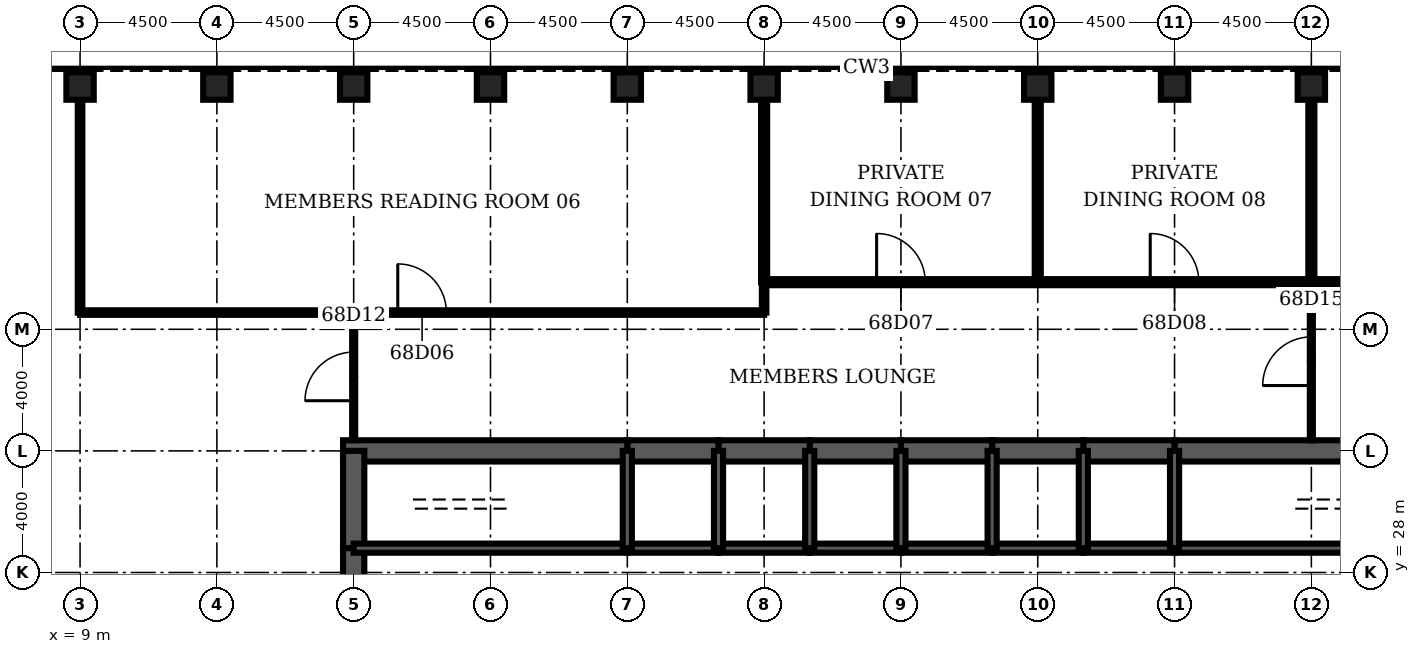
"""IFC4 building model, lengths in metres.
Left out: names, types, materials, properties, quantities, classifications, styles, units other than length and angle.
Written with IfcOpenShell. Run it as: python <this file> out.ifc"""

import sys

from ifc_helpers import new_model, si_unit, direction, frame, frame_2d, origin, origin_2d, place, context, subcontext, project, spatial, rectangle, hollow_rectangle, extrude, element, fill, save


model = new_model("IFC4")
c1 = context("Model", 3, precision=1e-05, world=origin(), true_north=direction((0.0, 1.0)))
c2 = subcontext(c1, "Body", "Model", "MODEL_VIEW")
j1 = project(units=[si_unit("LENGTHUNIT", "METRE"), si_unit("PLANEANGLEUNIT", "RADIAN")], contexts=[c1])
p1 = place(None, origin())
s1 = spatial("IfcSite", under=j1, at=p1, CompositionType="ELEMENT")
p2 = place(p1, origin())
s2 = spatial("IfcBuilding", under=s1, at=p2, CompositionType="ELEMENT")
p3 = place(p2, frame((0.0, 0.0, 300.5)))
s3 = spatial("IfcBuildingStorey", under=s2, at=p3, CompositionType="ELEMENT", Elevation=300.5)
for number, where, z_axis, x_axis in (
    (1, (49.5, 44.0, 0.0), (0.0, 0.0, 1.0), (0.0, 1.0, 0.0)),
    (2, (45.0, 44.0, 0.0), (0.0, 0.0, 1.0), (0.0, 1.0, 0.0)),
    (3, (40.5, 44.0, 0.0), (0.0, 0.0, 1.0), (0.0, 1.0, 0.0)),
    (4, (36.0, 44.0, 0.0), (0.0, 0.0, 1.0), (0.0, 1.0, 0.0)),
    (5, (31.5, 44.0, 0.0), (0.0, 0.0, 1.0), (0.0, 1.0, 0.0)),
    (6, (27.0, 44.0, 0.0), (0.0, 0.0, 1.0), (0.0, 1.0, 0.0)),
    (7, (22.5, 44.0, 0.0), (0.0, 0.0, 1.0), (0.0, 1.0, 0.0)),
    (8, (18.0, 44.0, 0.0), (0.0, 0.0, 1.0), (0.0, 1.0, 0.0)),
    (9, (13.5, 44.0, 0.0), (0.0, 0.0, 1.0), (0.0, 1.0, 0.0)),
    (10, (9.0, 44.0, 0.0), (0.0, 0.0, 1.0), (0.0, 1.0, 0.0)),
):
    element("IfcColumn", number, at=place(p3, frame(where, z_axis=z_axis, x_axis=x_axis)), inside=s3, PredefinedType="COLUMN", context=c2, shape_type="SweptSolid", body=[
        extrude(hollow_rectangle(XDim=0.9, YDim=0.9, WallThickness=0.06, at=origin_2d()), origin(), (0.0, 0.0, 1.0), 4.2),
    ])
p4 = place(p3, frame((54.35, 32.0, 0.0), z_axis=(0.0, 0.0, 1.0), x_axis=(-1.0, 0.0, 0.0)))
e11 = element("IfcWall", 11, at=p4, inside=s3, PredefinedType="SHEAR", context=c2, shape_type="SweptSolid", body=[
    extrude(rectangle(XDim=9.35, YDim=0.7, at=frame_2d((4.675, 0.0))), origin(), (0.0, 0.0, 1.0), 4.2),
])
for number, where, z_axis, x_axis in (
    (12, (45.0, 32.0, 0.0), (0.0, 0.0, 1.0), (-1.0, 0.0, 0.0)),
    (13, (42.0, 32.0, 0.0), (0.0, 0.0, 1.0), (-1.0, 0.0, 0.0)),
    (14, (39.0, 32.0, 0.0), (0.0, 0.0, 1.0), (-1.0, 0.0, 0.0)),
    (15, (36.0, 32.0, 0.0), (0.0, 0.0, 1.0), (-1.0, 0.0, 0.0)),
    (16, (33.0, 32.0, 0.0), (0.0, 0.0, 1.0), (-1.0, 0.0, 0.0)),
    (17, (30.0, 32.0, 0.0), (0.0, 0.0, 1.0), (-1.0, 0.0, 0.0)),
):
    element("IfcWall", number, at=place(p3, frame(where, z_axis=z_axis, x_axis=x_axis)), inside=s3, PredefinedType="SHEAR", context=c2, shape_type="SweptSolid", body=[
        extrude(rectangle(XDim=3.0, YDim=0.7, at=frame_2d((1.5, 0.0))), origin(), (0.0, 0.0, 1.0), 4.2),
    ])
p5 = place(p3, frame((27.0, 32.0, 0.0), z_axis=(0.0, 0.0, 1.0), x_axis=(-1.0, 0.0, 0.0)))
e18 = element("IfcWall", 18, at=p5, inside=s3, PredefinedType="SHEAR", context=c2, shape_type="SweptSolid", body=[
    extrude(rectangle(XDim=9.35, YDim=0.7, at=frame_2d((4.675, 0.0))), origin(), (0.0, 0.0, 1.0), 4.2),
])
p6 = place(p3, frame((18.0, 32.0, 0.0), z_axis=(0.0, 0.0, 1.0), x_axis=(0.0, -1.0, 0.0)))
e19 = element("IfcWall", 19, at=p6, inside=s3, PredefinedType="SHEAR", context=c2, shape_type="SweptSolid", body=[
    extrude(rectangle(XDim=3.2, YDim=0.7, at=frame_2d((1.6, 0.0))), origin(), (0.0, 0.0, 1.0), 4.2),
])
p7 = place(p3, frame((18.0, 28.8, 0.0), z_axis=(0.0, 0.0, 1.0), x_axis=(0.0, -1.0, 0.0)))
e20 = element("IfcWall", 20, at=p7, inside=s3, PredefinedType="SHEAR", context=c2, shape_type="SweptSolid", body=[
    extrude(rectangle(XDim=2.8, YDim=0.7, at=frame_2d((1.4, 0.0))), origin(), (0.0, 0.0, 1.0), 4.2),
])
p8 = place(p7, frame((0.4, 0.0, 0.0)))
e21 = element("IfcOpeningElement", 21, at=p8, cuts=e20, PredefinedType="OPENING", context=c2, shape_type="SweptSolid", body=[
    extrude(rectangle(XDim=1.8, YDim=2.1, at=frame_2d((0.9, 1.05))), frame((0.0, 0.36, 0.0), z_axis=(0.0, -1.0, 0.0), x_axis=(1.0, 0.0, 0.0)), (0.0, 0.0, 1.0), 0.72),
])
p9 = place(p3, frame((18.0, 28.8, 0.0), z_axis=(0.0, 0.0, 1.0), x_axis=(1.0, 0.0, 0.0)))
e22 = element("IfcWall", 22, at=p9, inside=s3, PredefinedType="SOLIDWALL", context=c2, shape_type="SweptSolid", body=[
    extrude(rectangle(XDim=9.0, YDim=0.3, at=frame_2d((4.5, 0.0))), origin(), (0.0, 0.0, 1.0), 4.2),
])
p10 = place(p9, frame((0.65, 0.0, 0.0)))
e23 = element("IfcOpeningElement", 23, at=p10, cuts=e22, PredefinedType="OPENING", context=c2, shape_type="SweptSolid", body=[
    extrude(rectangle(XDim=1.0, YDim=2.1, at=frame_2d((0.5, 1.05))), frame((0.0, 0.16, 0.0), z_axis=(0.0, -1.0, 0.0), x_axis=(1.0, 0.0, 0.0)), (0.0, 0.0, 1.0), 0.32),
])
p11 = place(p3, frame((27.0, 28.8, 0.0), z_axis=(0.0, 0.0, 1.0), x_axis=(1.0, 0.0, 0.0)))
e24 = element("IfcWall", 24, at=p11, inside=s3, PredefinedType="SOLIDWALL", context=c2, shape_type="SweptSolid", body=[
    extrude(rectangle(XDim=3.0, YDim=0.3, at=frame_2d((1.5, 0.0))), origin(), (0.0, 0.0, 1.0), 4.2),
])
p12 = place(p11, frame((0.95, 0.0, 0.0)))
e25 = element("IfcOpeningElement", 25, at=p12, cuts=e24, PredefinedType="OPENING", context=c2, shape_type="SweptSolid", body=[
    extrude(rectangle(XDim=1.1, YDim=2.2, at=frame_2d((0.55, 1.1))), frame((0.0, 0.16, 0.0), z_axis=(0.0, -1.0, 0.0), x_axis=(1.0, 0.0, 0.0)), (0.0, 0.0, 1.0), 0.32),
])
p13 = place(p3, frame((30.0, 28.8, 0.0), z_axis=(0.0, 0.0, 1.0), x_axis=(1.0, 0.0, 0.0)))
e26 = element("IfcWall", 26, at=p13, inside=s3, PredefinedType="SOLIDWALL", context=c2, shape_type="SweptSolid", body=[
    extrude(rectangle(XDim=3.0, YDim=0.3, at=frame_2d((1.5, 0.0))), origin(), (0.0, 0.0, 1.0), 4.2),
])
p14 = place(p13, frame((0.95, 0.0, 0.0)))
e27 = element("IfcOpeningElement", 27, at=p14, cuts=e26, PredefinedType="OPENING", context=c2, shape_type="SweptSolid", body=[
    extrude(rectangle(XDim=1.1, YDim=2.2, at=frame_2d((0.55, 1.1))), frame((0.0, 0.16, 0.0), z_axis=(0.0, -1.0, 0.0), x_axis=(1.0, 0.0, 0.0)), (0.0, 0.0, 1.0), 0.32),
])
p15 = place(p3, frame((33.0, 28.8, 0.0), z_axis=(0.0, 0.0, 1.0), x_axis=(1.0, 0.0, 0.0)))
e28 = element("IfcWall", 28, at=p15, inside=s3, PredefinedType="SOLIDWALL", context=c2, shape_type="SweptSolid", body=[
    extrude(rectangle(XDim=3.0, YDim=0.3, at=frame_2d((1.5, 0.0))), origin(), (0.0, 0.0, 1.0), 4.2),
])
p16 = place(p15, frame((0.95, 0.0, 0.0)))
e29 = element("IfcOpeningElement", 29, at=p16, cuts=e28, PredefinedType="OPENING", context=c2, shape_type="SweptSolid", body=[
    extrude(rectangle(XDim=1.1, YDim=2.2, at=frame_2d((0.55, 1.1))), frame((0.0, 0.16, 0.0), z_axis=(0.0, -1.0, 0.0), x_axis=(1.0, 0.0, 0.0)), (0.0, 0.0, 1.0), 0.32),
])
p17 = place(p3, frame((36.0, 28.8, 0.0), z_axis=(0.0, 0.0, 1.0), x_axis=(1.0, 0.0, 0.0)))
e30 = element("IfcWall", 30, at=p17, inside=s3, PredefinedType="SOLIDWALL", context=c2, shape_type="SweptSolid", body=[
    extrude(rectangle(XDim=3.0, YDim=0.3, at=frame_2d((1.5, 0.0))), origin(), (0.0, 0.0, 1.0), 4.2),
])
p18 = place(p17, frame((1.0, 0.0, 0.0)))
e31 = element("IfcOpeningElement", 31, at=p18, cuts=e30, PredefinedType="OPENING", context=c2, shape_type="SweptSolid", body=[
    extrude(rectangle(XDim=1.0, YDim=2.1, at=frame_2d((0.5, 1.05))), frame((0.0, 0.16, 0.0), z_axis=(0.0, -1.0, 0.0), x_axis=(1.0, 0.0, 0.0)), (0.0, 0.0, 1.0), 0.32),
])
p19 = place(p3, frame((39.0, 28.8, 0.0), z_axis=(0.0, 0.0, 1.0), x_axis=(1.0, 0.0, 0.0)))
e32 = element("IfcWall", 32, at=p19, inside=s3, PredefinedType="SOLIDWALL", context=c2, shape_type="SweptSolid", body=[
    extrude(rectangle(XDim=3.0, YDim=0.3, at=frame_2d((1.5, 0.0))), origin(), (0.0, 0.0, 1.0), 4.2),
])
p20 = place(p19, frame((1.0, 0.0, 0.0)))
e33 = element("IfcOpeningElement", 33, at=p20, cuts=e32, PredefinedType="OPENING", context=c2, shape_type="SweptSolid", body=[
    extrude(rectangle(XDim=1.0, YDim=2.1, at=frame_2d((0.5, 1.05))), frame((0.0, 0.16, 0.0), z_axis=(0.0, -1.0, 0.0), x_axis=(1.0, 0.0, 0.0)), (0.0, 0.0, 1.0), 0.32),
])
p21 = place(p3, frame((42.0, 28.8, 0.0), z_axis=(0.0, 0.0, 1.0), x_axis=(1.0, 0.0, 0.0)))
e34 = element("IfcWall", 34, at=p21, inside=s3, PredefinedType="SOLIDWALL", context=c2, shape_type="SweptSolid", body=[
    extrude(rectangle(XDim=3.0, YDim=0.3, at=frame_2d((1.5, 0.0))), origin(), (0.0, 0.0, 1.0), 4.2),
])
p22 = place(p21, frame((0.95, 0.0, 0.0)))
e35 = element("IfcOpeningElement", 35, at=p22, cuts=e34, PredefinedType="OPENING", context=c2, shape_type="SweptSolid", body=[
    extrude(rectangle(XDim=1.1, YDim=2.2, at=frame_2d((0.55, 1.1))), frame((0.0, 0.16, 0.0), z_axis=(0.0, -1.0, 0.0), x_axis=(1.0, 0.0, 0.0)), (0.0, 0.0, 1.0), 0.32),
])
p23 = place(p3, frame((45.0, 28.8, 0.0), z_axis=(0.0, 0.0, 1.0), x_axis=(1.0, 0.0, 0.0)))
e36 = element("IfcWall", 36, at=p23, inside=s3, PredefinedType="SOLIDWALL", context=c2, shape_type="SweptSolid", body=[
    extrude(rectangle(XDim=9.0, YDim=0.3, at=frame_2d((4.5, 0.0))), origin(), (0.0, 0.0, 1.0), 4.2),
])
p24 = place(p23, frame((7.35, 0.0, 0.0)))
e37 = element("IfcOpeningElement", 37, at=p24, cuts=e36, PredefinedType="OPENING", context=c2, shape_type="SweptSolid", body=[
    extrude(rectangle(XDim=1.0, YDim=2.1, at=frame_2d((0.5, 1.05))), frame((0.0, 0.16, 0.0), z_axis=(0.0, -1.0, 0.0), x_axis=(1.0, 0.0, 0.0)), (0.0, 0.0, 1.0), 0.32),
])
for number, where, z_axis, x_axis in (
    (38, (27.0, 28.8, 0.0), (0.0, 0.0, 1.0), (0.0, 1.0, 0.0)),
    (39, (30.0, 28.8, 0.0), (0.0, 0.0, 1.0), (0.0, 1.0, 0.0)),
    (40, (33.0, 28.8, 0.0), (0.0, 0.0, 1.0), (0.0, 1.0, 0.0)),
    (41, (36.0, 28.8, 0.0), (0.0, 0.0, 1.0), (0.0, 1.0, 0.0)),
    (42, (39.0, 28.8, 0.0), (0.0, 0.0, 1.0), (0.0, 1.0, 0.0)),
    (43, (42.0, 28.8, 0.0), (0.0, 0.0, 1.0), (0.0, 1.0, 0.0)),
    (44, (45.0, 28.8, 0.0), (0.0, 0.0, 1.0), (0.0, 1.0, 0.0)),
):
    element("IfcWall", number, at=place(p3, frame(where, z_axis=z_axis, x_axis=x_axis)), inside=s3, PredefinedType="SOLIDWALL", context=c2, shape_type="SweptSolid", body=[
        extrude(rectangle(XDim=3.2, YDim=0.3, at=frame_2d((1.6, 0.0))), origin(), (0.0, 0.0, 1.0), 4.2),
    ])
p25 = place(p3, frame((9.0, 36.55, 0.0), z_axis=(0.0, 0.0, 1.0), x_axis=(1.0, 0.0, 0.0)))
e45 = element("IfcWall", 45, at=p25, inside=s3, PredefinedType="PARTITIONING", context=c2, shape_type="SweptSolid", body=[
    extrude(rectangle(XDim=22.5, YDim=0.15, at=frame_2d((11.25, 0.0))), origin(), (0.0, 0.0, 1.0), 3.0),
])
p26 = place(p25, frame((10.45, 0.0, 0.0)))
e46 = element("IfcOpeningElement", 46, at=p26, cuts=e45, PredefinedType="OPENING", context=c2, shape_type="SweptSolid", body=[
    extrude(rectangle(XDim=1.6, YDim=2.1, at=frame_2d((0.8, 1.05))), frame((0.0, 0.085, 0.0), z_axis=(0.0, -1.0, 0.0), x_axis=(1.0, 0.0, 0.0)), (0.0, 0.0, 1.0), 0.17),
])
p27 = place(p3, frame((31.5, 37.55, 0.0), z_axis=(0.0, 0.0, 1.0), x_axis=(1.0, 0.0, 0.0)))
e47 = element("IfcWall", 47, at=p27, inside=s3, PredefinedType="PARTITIONING", context=c2, shape_type="SweptSolid", body=[
    extrude(rectangle(XDim=27.0, YDim=0.2, at=frame_2d((13.5, 0.0))), origin(), (0.0, 0.0, 1.0), 3.0),
])
p28 = place(p27, frame((3.7, 0.0, 0.0)))
e48 = element("IfcOpeningElement", 48, at=p28, cuts=e47, PredefinedType="OPENING", context=c2, shape_type="SweptSolid", body=[
    extrude(rectangle(XDim=1.6, YDim=2.1, at=frame_2d((0.8, 1.05))), frame((0.0, 0.11, 0.0), z_axis=(0.0, -1.0, 0.0), x_axis=(1.0, 0.0, 0.0)), (0.0, 0.0, 1.0), 0.22),
])
p29 = place(p27, frame((12.7, 0.0, 0.0)))
e49 = element("IfcOpeningElement", 49, at=p29, cuts=e47, PredefinedType="OPENING", context=c2, shape_type="SweptSolid", body=[
    extrude(rectangle(XDim=1.6, YDim=2.1, at=frame_2d((0.8, 1.05))), frame((0.0, 0.11, 0.0), z_axis=(0.0, -1.0, 0.0), x_axis=(1.0, 0.0, 0.0)), (0.0, 0.0, 1.0), 0.22),
])
p30 = place(p27, frame((21.7, 0.0, 0.0)))
e50 = element("IfcOpeningElement", 50, at=p30, cuts=e47, PredefinedType="OPENING", context=c2, shape_type="SweptSolid", body=[
    extrude(rectangle(XDim=1.6, YDim=2.1, at=frame_2d((0.8, 1.05))), frame((0.0, 0.11, 0.0), z_axis=(0.0, -1.0, 0.0), x_axis=(1.0, 0.0, 0.0)), (0.0, 0.0, 1.0), 0.22),
])
p31 = place(p3, frame((9.0, 36.55, 0.0), z_axis=(0.0, 0.0, 1.0), x_axis=(0.0, 1.0, 0.0)))
e51 = element("IfcWall", 51, at=p31, inside=s3, PredefinedType="PARTITIONING", context=c2, shape_type="SweptSolid", body=[
    extrude(rectangle(XDim=7.0, YDim=0.15, at=frame_2d((3.5, 0.0))), origin(), (0.0, 0.0, 1.0), 3.0),
])
p32 = place(p3, frame((18.0, 32.35, 0.0), z_axis=(0.0, 0.0, 1.0), x_axis=(0.0, 1.0, 0.0)))
e52 = element("IfcWall", 52, at=p32, inside=s3, PredefinedType="PARTITIONING", context=c2, shape_type="SweptSolid", body=[
    extrude(rectangle(XDim=4.2, YDim=0.1, at=frame_2d((2.1, 0.0))), origin(), (0.0, 0.0, 1.0), 3.0),
])
p33 = place(p32, frame((1.3, 0.0, 0.0)))
e53 = element("IfcOpeningElement", 53, at=p33, cuts=e52, PredefinedType="OPENING", context=c2, shape_type="SweptSolid", body=[
    extrude(rectangle(XDim=1.6, YDim=2.1, at=frame_2d((0.8, 1.05))), frame((0.0, 0.06, 0.0), z_axis=(0.0, -1.0, 0.0), x_axis=(1.0, 0.0, 0.0)), (0.0, 0.0, 1.0), 0.12),
])
p34 = place(p3, frame((31.5, 36.55, 0.0), z_axis=(0.0, 0.0, 1.0), x_axis=(0.0, 1.0, 0.0)))
e54 = element("IfcWall", 54, at=p34, inside=s3, PredefinedType="PARTITIONING", context=c2, shape_type="SweptSolid", body=[
    extrude(rectangle(XDim=1.0, YDim=0.15, at=frame_2d((0.5, 0.0))), origin(), (0.0, 0.0, 1.0), 3.0),
])
for number, where, z_axis, x_axis in (
    (55, (31.5, 37.55, 0.0), (0.0, 0.0, 1.0), (0.0, 1.0, 0.0)),
    (56, (40.5, 37.55, 0.0), (0.0, 0.0, 1.0), (0.0, 1.0, 0.0)),
):
    element("IfcWall", number, at=place(p3, frame(where, z_axis=z_axis, x_axis=x_axis)), inside=s3, PredefinedType="PARTITIONING", context=c2, shape_type="SweptSolid", body=[
        extrude(rectangle(XDim=6.0, YDim=0.2, at=frame_2d((3.0, 0.0))), origin(), (0.0, 0.0, 1.0), 3.0),
    ])
p35 = place(p3, frame((49.5, 32.35, 0.0), z_axis=(0.0, 0.0, 1.0), x_axis=(0.0, 1.0, 0.0)))
e57 = element("IfcWall", 57, at=p35, inside=s3, PredefinedType="PARTITIONING", context=c2, shape_type="SweptSolid", body=[
    extrude(rectangle(XDim=5.2, YDim=0.1, at=frame_2d((2.6, 0.0))), origin(), (0.0, 0.0, 1.0), 3.0),
])
p36 = place(p35, frame((1.8, 0.0, 0.0)))
e58 = element("IfcOpeningElement", 58, at=p36, cuts=e57, PredefinedType="OPENING", context=c2, shape_type="SweptSolid", body=[
    extrude(rectangle(XDim=1.6, YDim=2.1, at=frame_2d((0.8, 1.05))), frame((0.0, 0.06, 0.0), z_axis=(0.0, -1.0, 0.0), x_axis=(1.0, 0.0, 0.0)), (0.0, 0.0, 1.0), 0.12),
])
p37 = place(p3, frame((49.5, 37.55, 0.0), z_axis=(0.0, 0.0, 1.0), x_axis=(0.0, 1.0, 0.0)))
e59 = element("IfcWall", 59, at=p37, inside=s3, PredefinedType="PARTITIONING", context=c2, shape_type="SweptSolid", body=[
    extrude(rectangle(XDim=6.0, YDim=0.2, at=frame_2d((3.0, 0.0))), origin(), (0.0, 0.0, 1.0), 3.0),
])
p38 = place(p26, origin())
e60 = element("IfcDoor", 60, at=p38, inside=s3, OperationType="SINGLE_SWING_LEFT", PredefinedType="DOOR", context=c2, shape_type="SweptSolid", body=[
    extrude(rectangle(XDim=1.6, YDim=2.1, at=frame_2d((0.8, 1.05))), frame((0.0, 0.025, 0.0), z_axis=(0.0, -1.0, 0.0), x_axis=(1.0, 0.0, 0.0)), (0.0, 0.0, 1.0), 0.05),
])
fill(e46, e60)
p39 = place(p28, origin())
e61 = element("IfcDoor", 61, at=p39, inside=s3, OperationType="SINGLE_SWING_LEFT", PredefinedType="DOOR", context=c2, shape_type="SweptSolid", body=[
    extrude(rectangle(XDim=1.6, YDim=2.1, at=frame_2d((0.8, 1.05))), frame((0.0, 0.025, 0.0), z_axis=(0.0, -1.0, 0.0), x_axis=(1.0, 0.0, 0.0)), (0.0, 0.0, 1.0), 0.05),
])
fill(e48, e61)
p40 = place(p29, origin())
e62 = element("IfcDoor", 62, at=p40, inside=s3, OperationType="SINGLE_SWING_LEFT", PredefinedType="DOOR", context=c2, shape_type="SweptSolid", body=[
    extrude(rectangle(XDim=1.6, YDim=2.1, at=frame_2d((0.8, 1.05))), frame((0.0, 0.025, 0.0), z_axis=(0.0, -1.0, 0.0), x_axis=(1.0, 0.0, 0.0)), (0.0, 0.0, 1.0), 0.05),
])
fill(e49, e62)
p41 = place(p33, origin())
e63 = element("IfcDoor", 63, at=p41, inside=s3, OperationType="SINGLE_SWING_LEFT", PredefinedType="DOOR", context=c2, shape_type="SweptSolid", body=[
    extrude(rectangle(XDim=1.6, YDim=2.1, at=frame_2d((0.8, 1.05))), frame((0.0, 0.025, 0.0), z_axis=(0.0, -1.0, 0.0), x_axis=(1.0, 0.0, 0.0)), (0.0, 0.0, 1.0), 0.05),
])
fill(e53, e63)
p42 = place(p36, origin())
e64 = element("IfcDoor", 64, at=p42, inside=s3, OperationType="SINGLE_SWING_LEFT", PredefinedType="DOOR", context=c2, shape_type="SweptSolid", body=[
    extrude(rectangle(XDim=1.6, YDim=2.1, at=frame_2d((0.8, 1.05))), frame((0.0, 0.025, 0.0), z_axis=(0.0, -1.0, 0.0), x_axis=(1.0, 0.0, 0.0)), (0.0, 0.0, 1.0), 0.05),
])
fill(e58, e64)
p43 = place(p22, origin())
e65 = element("IfcDoor", 65, at=p43, inside=s3, OperationType="DOUBLE_DOOR_SLIDING", PredefinedType="USERDEFINED", context=c2, shape_type="SweptSolid", body=[
    extrude(rectangle(XDim=1.1, YDim=2.2, at=frame_2d((0.55, 1.1))), frame((0.0, 0.025, 0.0), z_axis=(0.0, -1.0, 0.0), x_axis=(1.0, 0.0, 0.0)), (0.0, 0.0, 1.0), 0.05),
])
fill(e35, e65)
p44 = place(p12, origin())
e66 = element("IfcDoor", 66, at=p44, inside=s3, OperationType="DOUBLE_DOOR_SLIDING", PredefinedType="USERDEFINED", context=c2, shape_type="SweptSolid", body=[
    extrude(rectangle(XDim=1.1, YDim=2.2, at=frame_2d((0.55, 1.1))), frame((0.0, 0.025, 0.0), z_axis=(0.0, -1.0, 0.0), x_axis=(1.0, 0.0, 0.0)), (0.0, 0.0, 1.0), 0.05),
])
fill(e25, e66)
p45 = place(p14, origin())
e67 = element("IfcDoor", 67, at=p45, inside=s3, OperationType="DOUBLE_DOOR_SLIDING", PredefinedType="USERDEFINED", context=c2, shape_type="SweptSolid", body=[
    extrude(rectangle(XDim=1.1, YDim=2.2, at=frame_2d((0.55, 1.1))), frame((0.0, 0.025, 0.0), z_axis=(0.0, -1.0, 0.0), x_axis=(1.0, 0.0, 0.0)), (0.0, 0.0, 1.0), 0.05),
])
fill(e27, e67)
p46 = place(p16, origin())
e68 = element("IfcDoor", 68, at=p46, inside=s3, OperationType="DOUBLE_DOOR_SLIDING", PredefinedType="USERDEFINED", context=c2, shape_type="SweptSolid", body=[
    extrude(rectangle(XDim=1.1, YDim=2.2, at=frame_2d((0.55, 1.1))), frame((0.0, 0.025, 0.0), z_axis=(0.0, -1.0, 0.0), x_axis=(1.0, 0.0, 0.0)), (0.0, 0.0, 1.0), 0.05),
])
fill(e29, e68)
p47 = place(p10, origin())
e69 = element("IfcDoor", 69, at=p47, inside=s3, OperationType="SINGLE_SWING_LEFT", PredefinedType="DOOR", context=c2, shape_type="SweptSolid", body=[
    extrude(rectangle(XDim=1.0, YDim=2.1, at=frame_2d((0.5, 1.05))), frame((0.0, 0.025, 0.0), z_axis=(0.0, -1.0, 0.0), x_axis=(1.0, 0.0, 0.0)), (0.0, 0.0, 1.0), 0.05),
])
fill(e23, e69)
p48 = place(p8, origin())
e70 = element("IfcDoor", 70, at=p48, inside=s3, OperationType="SINGLE_SWING_LEFT", PredefinedType="DOOR", context=c2, shape_type="SweptSolid", body=[
    extrude(rectangle(XDim=1.8, YDim=2.1, at=frame_2d((0.9, 1.05))), frame((0.0, 0.35, 0.0), z_axis=(0.0, -1.0, 0.0), x_axis=(1.0, 0.0, 0.0)), (0.0, 0.0, 1.0), 0.699),
])
fill(e21, e70)
p49 = place(p18, origin())
e71 = element("IfcDoor", 71, at=p49, inside=s3, OperationType="SINGLE_SWING_LEFT", PredefinedType="DOOR", context=c2, shape_type="SweptSolid", body=[
    extrude(rectangle(XDim=1.0, YDim=2.1, at=frame_2d((0.5, 1.05))), frame((0.0, 0.025, 0.0), z_axis=(0.0, -1.0, 0.0), x_axis=(1.0, 0.0, 0.0)), (0.0, 0.0, 1.0), 0.05),
])
fill(e31, e71)
p50 = place(p20, origin())
e72 = element("IfcDoor", 72, at=p50, inside=s3, OperationType="SINGLE_SWING_LEFT", PredefinedType="DOOR", context=c2, shape_type="SweptSolid", body=[
    extrude(rectangle(XDim=1.0, YDim=2.1, at=frame_2d((0.5, 1.05))), frame((0.0, 0.025, 0.0), z_axis=(0.0, -1.0, 0.0), x_axis=(1.0, 0.0, 0.0)), (0.0, 0.0, 1.0), 0.05),
])
fill(e33, e72)
save(model, sys.argv[1])
